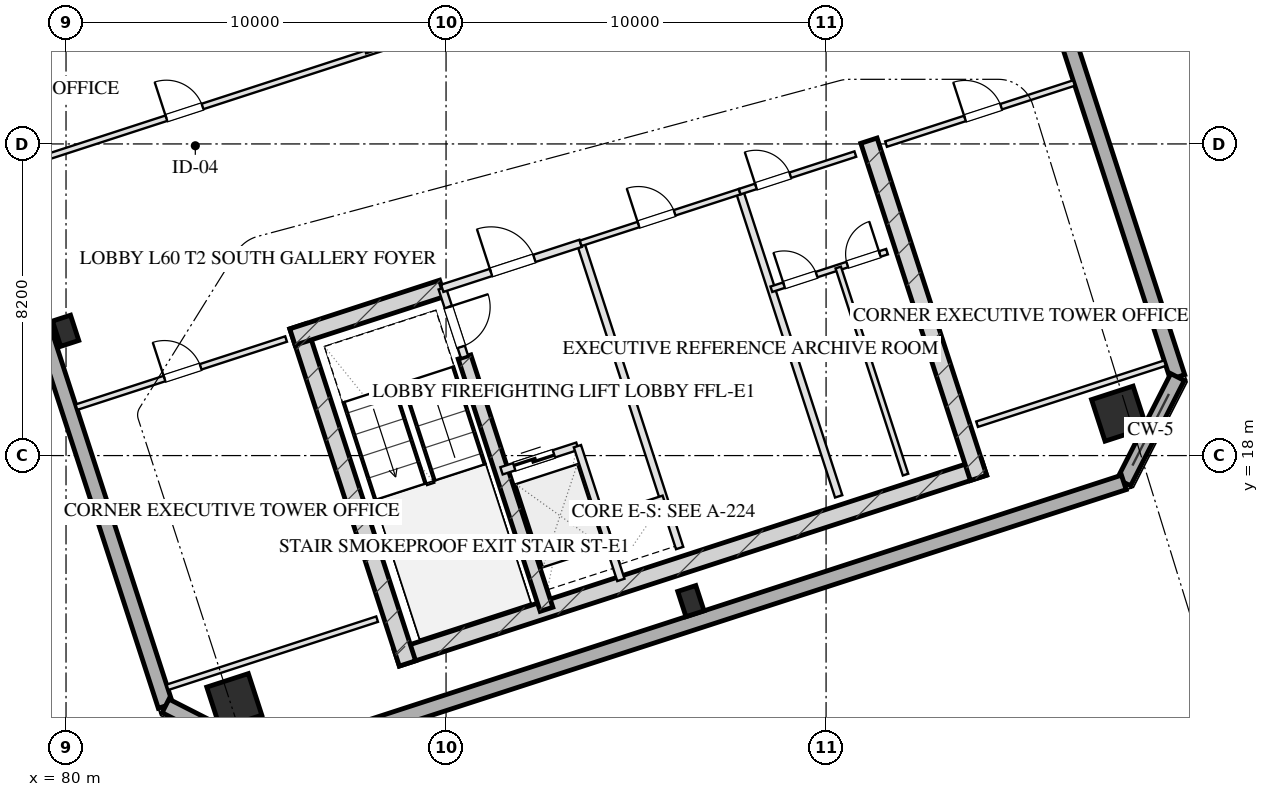
"""IFC4 building model, lengths in metres.
Left out: names, types, materials, properties, quantities, classifications, styles, units other than length and angle.
Written with IfcOpenShell. Run it as: python <this file> out.ifc"""

import sys

from ifc_helpers import new_model, si_unit, direction, frame, frame_2d, origin, origin_2d, place, context, subcontext, project, spatial, rectangle, hollow_rectangle, extrude, element, fill, save


model = new_model("IFC4")
c1 = context("Model", 3, precision=1e-05, world=origin(), true_north=direction((0.0, 1.0)))
c2 = subcontext(c1, "Body", "Model", "MODEL_VIEW")
j1 = project(units=[si_unit("LENGTHUNIT", "METRE"), si_unit("PLANEANGLEUNIT", "RADIAN")], contexts=[c1])
p1 = place(None, origin())
s1 = spatial("IfcSite", under=j1, at=p1, CompositionType="ELEMENT")
p2 = place(p1, origin())
s2 = spatial("IfcBuilding", under=s1, at=p2, CompositionType="ELEMENT")
p3 = place(p2, frame((0.0, 0.0, 223.1)))
s3 = spatial("IfcBuildingStorey", under=s2, at=p3, CompositionType="ELEMENT", Elevation=223.1)
p4 = place(p3, frame((88.701, 12.675, 0.0), z_axis=(0.0, 0.0, 1.0), x_axis=(0.95105824505, 0.309011673763, 0.0)))
e1 = element("IfcWall", 1, at=p4, inside=s3, PredefinedType="SHEAR", context=c2, shape_type="SweptSolid", body=[
    extrude(rectangle(XDim=16.25, YDim=0.45, at=frame_2d((8.125, 0.0))), origin(), (0.0, 0.0, 1.0), 3.45),
])
for number, where, z_axis, x_axis in (
    (2, (86.102, 21.404, 0.0), (0.0, 0.0, 1.0), (0.309, -0.951, 0.0)),
    (3, (101.128, 26.286, 0.0), (0.0, 0.0, 1.0), (0.309, -0.951, 0.0)),
):
    element("IfcWall", number, at=place(p3, frame(where, z_axis=z_axis, x_axis=x_axis)), inside=s3, PredefinedType="SHEAR", context=c2, shape_type="SweptSolid", body=[
        extrude(rectangle(XDim=9.33, YDim=0.45, at=frame_2d((4.665, 0.0))), origin(), (0.0, 0.0, 1.0), 3.45),
    ])
p5 = place(p3, frame((90.486, 20.594, 0.0), z_axis=(0.0, 0.0, 1.0), x_axis=(0.309020428229, -0.951055400562, 0.0)))
e4 = element("IfcWall", 4, at=p5, inside=s3, PredefinedType="SHEAR", context=c2, shape_type="SweptSolid", body=[
    extrude(rectangle(XDim=6.98, YDim=0.35, at=frame_2d((3.49, 0.0))), origin(), (0.0, 0.0, 1.0), 3.45),
])
p6 = place(p3, frame((85.957, 21.12, 0.0), z_axis=(0.0, 0.0, 1.0), x_axis=(0.951064796122, 0.308991510526, 0.0)))
e5 = element("IfcWall", 5, at=p6, inside=s3, PredefinedType="SHEAR", context=c2, shape_type="SweptSolid", body=[
    extrude(rectangle(XDim=4.145, YDim=0.45, at=frame_2d((2.073, 0.0))), origin(), (0.0, 0.0, 1.0), 3.45),
])
for number, where, z_axis, x_axis in (
    (6, (84.428, 11.539, 0.0), (0.0, 0.0, 1.0), (0.951, 0.309, 0.0)),
    (7, (107.71, 19.104, 0.0), (0.0, 0.0, 1.0), (0.951, 0.309, 0.0)),
):
    element("IfcColumn", number, at=place(p3, frame(where, z_axis=z_axis, x_axis=x_axis)), inside=s3, PredefinedType="COLUMN", context=c2, shape_type="SweptSolid", body=[
        extrude(hollow_rectangle(XDim=1.15, YDim=1.15, WallThickness=0.04, at=origin_2d()), origin(), (0.0, 0.0, 1.0), 3.451),
    ])
for number, where, z_axis, x_axis in (
    (8, (79.99, 21.284, 0.0), (0.0, 0.0, 1.0), (0.951, 0.309, 0.0)),
    (9, (96.443, 14.17, 0.0), (0.0, 0.0, 1.0), (0.951, 0.309, 0.0)),
):
    element("IfcColumn", number, at=place(p3, frame(where, z_axis=z_axis, x_axis=x_axis)), inside=s3, PredefinedType="COLUMN", context=c2, shape_type="SweptSolid", body=[
        extrude(hollow_rectangle(XDim=0.5, YDim=0.7, WallThickness=0.025, at=origin_2d()), origin(), (0.0, 0.0, 1.0), 3.451),
    ])
p7 = place(p3, frame((82.618, 11.414, 0.0), z_axis=(0.0, 0.0, 1.0), x_axis=(-0.309016491071, 0.951056679828, 0.0)))
e10 = element("IfcWall", 10, at=p7, inside=s3, PredefinedType="SOLIDWALL", context=c2, shape_type="SweptSolid", body=[
    extrude(rectangle(XDim=38.4, YDim=0.4, at=frame_2d((19.2, 0.0))), origin(), (0.0, 0.0, 1.0), 2.61),
])
p8 = place(p7, frame((11.75, 0.0, 0.75)))
e11 = element("IfcOpeningElement", 11, at=p8, cuts=e10, PredefinedType="OPENING", context=c2, shape_type="SweptSolid", body=[
    extrude(rectangle(XDim=2.1, YDim=1.46, at=frame_2d((1.05, 0.73))), frame((0.0, 0.21, 0.0), z_axis=(0.0, -1.0, 0.0), x_axis=(1.0, 0.0, 0.0)), (0.0, 0.0, 1.0), 0.42),
])
p9 = place(p7, frame((15.55, 0.0, 0.75)))
e12 = element("IfcOpeningElement", 12, at=p9, cuts=e10, PredefinedType="OPENING", context=c2, shape_type="SweptSolid", body=[
    extrude(rectangle(XDim=2.1, YDim=1.46, at=frame_2d((1.05, 0.73))), frame((0.0, 0.21, 0.0), z_axis=(0.0, -1.0, 0.0), x_axis=(1.0, 0.0, 0.0)), (0.0, 0.0, 1.0), 0.42),
])
p10 = place(p7, frame((20.75, 0.0, 0.75)))
e13 = element("IfcOpeningElement", 13, at=p10, cuts=e10, PredefinedType="OPENING", context=c2, shape_type="SweptSolid", body=[
    extrude(rectangle(XDim=2.1, YDim=1.46, at=frame_2d((1.05, 0.73))), frame((0.0, 0.21, 0.0), z_axis=(0.0, -1.0, 0.0), x_axis=(1.0, 0.0, 0.0)), (0.0, 0.0, 1.0), 0.42),
])
p11 = place(p7, frame((24.55, 0.0, 0.75)))
e14 = element("IfcOpeningElement", 14, at=p11, cuts=e10, PredefinedType="OPENING", context=c2, shape_type="SweptSolid", body=[
    extrude(rectangle(XDim=2.1, YDim=1.46, at=frame_2d((1.05, 0.73))), frame((0.0, 0.21, 0.0), z_axis=(0.0, -1.0, 0.0), x_axis=(1.0, 0.0, 0.0)), (0.0, 0.0, 1.0), 0.42),
])
p12 = place(p3, frame((97.382, 56.586, 0.0), z_axis=(0.0, 0.0, 1.0), x_axis=(0.309016491071, -0.951056679828, 0.0)))
e15 = element("IfcWall", 15, at=p12, inside=s3, PredefinedType="SOLIDWALL", context=c2, shape_type="SweptSolid", body=[
    extrude(rectangle(XDim=38.4, YDim=0.4, at=frame_2d((19.2, 0.0))), origin(), (0.0, 0.0, 1.0), 2.61),
])
p13 = place(p12, frame((24.55, 0.0, 0.75)))
e16 = element("IfcOpeningElement", 16, at=p13, cuts=e15, PredefinedType="OPENING", context=c2, shape_type="SweptSolid", body=[
    extrude(rectangle(XDim=2.1, YDim=1.46, at=frame_2d((1.05, 0.73))), frame((0.0, 0.21, 0.0), z_axis=(0.0, -1.0, 0.0), x_axis=(1.0, 0.0, 0.0)), (0.0, 0.0, 1.0), 0.42),
])
p14 = place(p12, frame((20.75, 0.0, 0.75)))
e17 = element("IfcOpeningElement", 17, at=p14, cuts=e15, PredefinedType="OPENING", context=c2, shape_type="SweptSolid", body=[
    extrude(rectangle(XDim=2.1, YDim=1.46, at=frame_2d((1.05, 0.73))), frame((0.0, 0.21, 0.0), z_axis=(0.0, -1.0, 0.0), x_axis=(1.0, 0.0, 0.0)), (0.0, 0.0, 1.0), 0.42),
])
p15 = place(p12, frame((15.55, 0.0, 0.75)))
e18 = element("IfcOpeningElement", 18, at=p15, cuts=e15, PredefinedType="OPENING", context=c2, shape_type="SweptSolid", body=[
    extrude(rectangle(XDim=2.1, YDim=1.46, at=frame_2d((1.05, 0.73))), frame((0.0, 0.21, 0.0), z_axis=(0.0, -1.0, 0.0), x_axis=(1.0, 0.0, 0.0)), (0.0, 0.0, 1.0), 0.42),
])
p16 = place(p12, frame((11.75, 0.0, 0.75)))
e19 = element("IfcOpeningElement", 19, at=p16, cuts=e15, PredefinedType="OPENING", context=c2, shape_type="SweptSolid", body=[
    extrude(rectangle(XDim=2.1, YDim=1.46, at=frame_2d((1.05, 0.73))), frame((0.0, 0.21, 0.0), z_axis=(0.0, -1.0, 0.0), x_axis=(1.0, 0.0, 0.0)), (0.0, 0.0, 1.0), 0.42),
])
p17 = place(p3, frame((109.248, 20.066, 0.0), z_axis=(0.0, 0.0, 1.0), x_axis=(-0.453949291228, -0.891027519774, 0.0)))
e20 = element("IfcWall", 20, at=p17, inside=s3, PredefinedType="SOLIDWALL", context=c2, shape_type="SweptSolid", body=[
    extrude(rectangle(XDim=3.111, YDim=0.4, at=frame_2d((1.556, 0.0))), origin(), (0.0, 0.0, 1.0), 2.61),
])
p18 = place(p3, frame((107.835, 17.294, 0.0), z_axis=(0.0, 0.0, 1.0), x_axis=(-0.951058012937, -0.309012388148, 0.0)))
e21 = element("IfcWall", 21, at=p18, inside=s3, PredefinedType="SOLIDWALL", context=c2, shape_type="SweptSolid", body=[
    extrude(rectangle(XDim=23.6, YDim=0.4, at=frame_2d((11.8, 0.0))), origin(), (0.0, 0.0, 1.0), 2.61),
])
p19 = place(p3, frame((85.39, 10.001, 0.0), z_axis=(0.0, 0.0, 1.0), x_axis=(-0.890979603174, 0.454043331334, 0.0)))
e22 = element("IfcWall", 22, at=p19, inside=s3, PredefinedType="SOLIDWALL", context=c2, shape_type="SweptSolid", body=[
    extrude(rectangle(XDim=3.111, YDim=0.4, at=frame_2d((1.556, 0.0))), origin(), (0.0, 0.0, 1.0), 2.61),
])
p20 = place(p3, frame((89.899, 22.401, 0.0), z_axis=(0.0, 0.0, 1.0), x_axis=(0.308932062672, -0.951084108086, 0.0)))
e23 = element("IfcWall", 23, at=p20, inside=s3, PredefinedType="PARTITIONING", context=c2, shape_type="SweptSolid", body=[
    extrude(rectangle(XDim=1.9, YDim=0.2, at=frame_2d((0.95, 0.0))), origin(), (0.0, 0.0, 1.0), 3.175),
])
p21 = place(p20, frame((0.52, 0.0, 0.0)))
e24 = element("IfcOpeningElement", 24, at=p21, cuts=e23, PredefinedType="OPENING", context=c2, shape_type="SweptSolid", body=[
    extrude(rectangle(XDim=1.1, YDim=2.05, at=frame_2d((0.55, 1.025))), frame((0.0, 0.11, 0.0), z_axis=(0.0, -1.0, 0.0), x_axis=(1.0, 0.0, 0.0)), (0.0, 0.0, 1.0), 0.22),
])
p22 = place(p3, frame((93.542, 23.585, 0.0), z_axis=(0.0, 0.0, 1.0), x_axis=(0.309042196757, -0.951048327176, 0.0)))
e25 = element("IfcWall", 25, at=p22, inside=s3, PredefinedType="PARTITIONING", context=c2, shape_type="SweptSolid", body=[
    extrude(rectangle(XDim=8.43, YDim=0.2, at=frame_2d((4.215, 0.0))), origin(), (0.0, 0.0, 1.0), 3.175),
])
p23 = place(p3, frame((89.899, 22.401, 0.0), z_axis=(0.0, 0.0, 1.0), x_axis=(0.951046716504, 0.309047153403, 0.0)))
e26 = element("IfcWall", 26, at=p23, inside=s3, PredefinedType="PARTITIONING", context=c2, shape_type="SweptSolid", body=[
    extrude(rectangle(XDim=3.83, YDim=0.2, at=frame_2d((1.915, 0.0))), origin(), (0.0, 0.0, 1.0), 3.175),
])
p24 = place(p23, frame((1.35, 0.0, 0.0)))
e27 = element("IfcOpeningElement", 27, at=p24, cuts=e26, PredefinedType="OPENING", context=c2, shape_type="SweptSolid", body=[
    extrude(rectangle(XDim=1.2, YDim=2.05, at=frame_2d((0.6, 1.025))), frame((0.0, 0.11, 0.0), z_axis=(0.0, -1.0, 0.0), x_axis=(1.0, 0.0, 0.0)), (0.0, 0.0, 1.0), 0.22),
])
p25 = place(p3, frame((91.46, 17.598, 0.0), z_axis=(0.0, 0.0, 1.0), x_axis=(0.951062257173, 0.308999325213, 0.0)))
e28 = element("IfcWall", 28, at=p25, inside=s3, PredefinedType="PARTITIONING", context=c2, shape_type="SweptSolid", body=[
    extrude(rectangle(XDim=2.1, YDim=0.2, at=frame_2d((1.05, 0.0))), origin(), (0.0, 0.0, 1.0), 3.175),
])
p26 = place(p25, frame((0.35, 0.0, 0.0)))
e29 = element("IfcOpeningElement", 29, at=p26, cuts=e28, PredefinedType="OPENING", context=c2, shape_type="SweptSolid", body=[
    extrude(rectangle(XDim=1.1, YDim=2.05, at=frame_2d((0.55, 1.025))), frame((0.0, 0.11, 0.0), z_axis=(0.0, -1.0, 0.0), x_axis=(1.0, 0.0, 0.0)), (0.0, 0.0, 1.0), 0.22),
])
p27 = place(p3, frame((93.457, 18.247, 0.0), z_axis=(0.0, 0.0, 1.0), x_axis=(0.3089935693, -0.951064127245, 0.0)))
e30 = element("IfcWall", 30, at=p27, inside=s3, PredefinedType="PARTITIONING", context=c2, shape_type="SweptSolid", body=[
    extrude(rectangle(XDim=3.7, YDim=0.2, at=frame_2d((1.85, 0.0))), origin(), (0.0, 0.0, 1.0), 3.175),
])
p28 = place(p3, frame((94.084, 16.317, 0.0), z_axis=(0.0, 0.0, 1.0), x_axis=(0.951041328149, 0.309063734775, 0.0)))
e31 = element("IfcWall", 31, at=p28, inside=s3, PredefinedType="PARTITIONING", context=c2, shape_type="SweptSolid", body=[
    extrude(rectangle(XDim=1.73, YDim=0.2, at=frame_2d((0.865, 0.0))), origin(), (0.0, 0.0, 1.0), 3.175),
])
p29 = place(p3, frame((97.727, 24.944, 0.0), z_axis=(0.0, 0.0, 1.0), x_axis=(0.309016001439, -0.951056838919, 0.0)))
e32 = element("IfcWall", 32, at=p29, inside=s3, PredefinedType="PARTITIONING", context=c2, shape_type="SweptSolid", body=[
    extrude(rectangle(XDim=8.43, YDim=0.2, at=frame_2d((4.215, 0.0))), origin(), (0.0, 0.0, 1.0), 3.175),
])
p30 = place(p3, frame((93.542, 23.585, 0.0), z_axis=(0.0, 0.0, 1.0), x_axis=(0.951063829732, 0.308994485023, 0.0)))
e33 = element("IfcWall", 33, at=p30, inside=s3, PredefinedType="PARTITIONING", context=c2, shape_type="SweptSolid", body=[
    extrude(rectangle(XDim=4.4, YDim=0.15, at=frame_2d((2.2, 0.0))), origin(), (0.0, 0.0, 1.0), 3.175),
])
p31 = place(p30, frame((1.6, 0.0, 0.0)))
e34 = element("IfcOpeningElement", 34, at=p31, cuts=e33, PredefinedType="OPENING", context=c2, shape_type="SweptSolid", body=[
    extrude(rectangle(XDim=1.0, YDim=2.05, at=frame_2d((0.5, 1.025))), frame((0.0, 0.085, 0.0), z_axis=(0.0, -1.0, 0.0), x_axis=(1.0, 0.0, 0.0)), (0.0, 0.0, 1.0), 0.17),
])
p32 = place(p3, frame((97.727, 24.944, 0.0), z_axis=(0.0, 0.0, 1.0), x_axis=(0.951036872128, 0.309077446369, 0.0)))
e35 = element("IfcWall", 35, at=p32, inside=s3, PredefinedType="PARTITIONING", context=c2, shape_type="SweptSolid", body=[
    extrude(rectangle(XDim=3.2, YDim=0.15, at=frame_2d((1.6, 0.0))), origin(), (0.0, 0.0, 1.0), 3.175),
])
p33 = place(p32, frame((0.45, 0.0, 0.0)))
e36 = element("IfcOpeningElement", 36, at=p33, cuts=e35, PredefinedType="OPENING", context=c2, shape_type="SweptSolid", body=[
    extrude(rectangle(XDim=0.95, YDim=2.05, at=frame_2d((0.475, 1.025))), frame((0.0, 0.085, 0.0), z_axis=(0.0, -1.0, 0.0), x_axis=(1.0, 0.0, 0.0)), (0.0, 0.0, 1.0), 0.17),
])
p34 = place(p3, frame((98.561, 22.376, 0.0), z_axis=(0.0, 0.0, 1.0), x_axis=(0.95104415986, 0.309055020985, 0.0)))
e37 = element("IfcWall", 37, at=p34, inside=s3, PredefinedType="PARTITIONING", context=c2, shape_type="SweptSolid", body=[
    extrude(rectangle(XDim=3.2, YDim=0.15, at=frame_2d((1.6, 0.0))), origin(), (0.0, 0.0, 1.0), 3.175),
])
p35 = place(p34, frame((0.35, 0.0, 0.0)))
e38 = element("IfcOpeningElement", 38, at=p35, cuts=e37, PredefinedType="OPENING", context=c2, shape_type="SweptSolid", body=[
    extrude(rectangle(XDim=0.9, YDim=2.05, at=frame_2d((0.45, 1.025))), frame((0.0, 0.085, 0.0), z_axis=(0.0, -1.0, 0.0), x_axis=(1.0, 0.0, 0.0)), (0.0, 0.0, 1.0), 0.17),
])
p36 = place(p34, frame((2.1, 0.0, 0.0)))
e39 = element("IfcOpeningElement", 39, at=p36, cuts=e37, PredefinedType="OPENING", context=c2, shape_type="SweptSolid", body=[
    extrude(rectangle(XDim=0.9, YDim=2.05, at=frame_2d((0.45, 1.025))), frame((0.0, 0.085, 0.0), z_axis=(0.0, -1.0, 0.0), x_axis=(1.0, 0.0, 0.0)), (0.0, 0.0, 1.0), 0.17),
])
p37 = place(p3, frame((100.32, 22.948, 0.0), z_axis=(0.0, 0.0, 1.0), x_axis=(0.309035009867, -0.951050662518, 0.0)))
e40 = element("IfcWall", 40, at=p37, inside=s3, PredefinedType="PARTITIONING", context=c2, shape_type="SweptSolid", body=[
    extrude(rectangle(XDim=5.73, YDim=0.15, at=frame_2d((2.865, 0.0))), origin(), (0.0, 0.0, 1.0), 3.175),
])
p38 = place(p3, frame((82.669, 11.903, 0.0), z_axis=(0.0, 0.0, 1.0), x_axis=(0.951059431056, 0.309008023519, 0.0)))
e41 = element("IfcWall", 41, at=p38, inside=s3, PredefinedType="PARTITIONING", context=c2, shape_type="SweptSolid", body=[
    extrude(rectangle(XDim=5.8, YDim=0.15, at=frame_2d((2.9, 0.0))), origin(), (0.0, 0.0, 1.0), 3.175),
])
p39 = place(p3, frame((80.275, 19.274, 0.0), z_axis=(0.0, 0.0, 1.0), x_axis=(0.951059431056, 0.309008023519, 0.0)))
e42 = element("IfcWall", 42, at=p39, inside=s3, PredefinedType="PARTITIONING", context=c2, shape_type="SweptSolid", body=[
    extrude(rectangle(XDim=5.8, YDim=0.15, at=frame_2d((2.9, 0.0))), origin(), (0.0, 0.0, 1.0), 3.175),
])
p40 = place(p39, frame((2.436, 0.0, 0.0)))
e43 = element("IfcOpeningElement", 43, at=p40, cuts=e42, PredefinedType="OPENING", context=c2, shape_type="SweptSolid", body=[
    extrude(rectangle(XDim=1.0, YDim=2.05, at=frame_2d((0.5, 1.025))), frame((0.0, 0.085, 0.0), z_axis=(0.0, -1.0, 0.0), x_axis=(1.0, 0.0, 0.0)), (0.0, 0.0, 1.0), 0.17),
])
p41 = place(p3, frame((103.973, 18.825, 0.0), z_axis=(0.0, 0.0, 1.0), x_axis=(0.951055112834, 0.309021313752, 0.0)))
e44 = element("IfcWall", 44, at=p41, inside=s3, PredefinedType="PARTITIONING", context=c2, shape_type="SweptSolid", body=[
    extrude(rectangle(XDim=5.2, YDim=0.15, at=frame_2d((2.6, 0.0))), origin(), (0.0, 0.0, 1.0), 3.175),
])
p42 = place(p3, frame((101.578, 26.196, 0.0), z_axis=(0.0, 0.0, 1.0), x_axis=(0.951064427824, 0.308992644131, 0.0)))
e45 = element("IfcWall", 45, at=p42, inside=s3, PredefinedType="PARTITIONING", context=c2, shape_type="SweptSolid", body=[
    extrude(rectangle(XDim=5.2, YDim=0.15, at=frame_2d((2.6, 0.0))), origin(), (0.0, 0.0, 1.0), 3.175),
])
p43 = place(p42, frame((2.184, 0.0, 0.0)))
e46 = element("IfcOpeningElement", 46, at=p43, cuts=e45, PredefinedType="OPENING", context=c2, shape_type="SweptSolid", body=[
    extrude(rectangle(XDim=1.0, YDim=2.05, at=frame_2d((0.5, 1.025))), frame((0.0, 0.085, 0.0), z_axis=(0.0, -1.0, 0.0), x_axis=(1.0, 0.0, 0.0)), (0.0, 0.0, 1.0), 0.17),
])
p44 = place(p3, frame((78.266, 25.456, 0.0), z_axis=(0.0, 0.0, 1.0), x_axis=(0.951056617779, 0.30901668204, 0.0)))
e47 = element("IfcWall", 47, at=p44, inside=s3, PredefinedType="PARTITIONING", context=c2, shape_type="SweptSolid", body=[
    extrude(rectangle(XDim=15.275, YDim=0.15, at=frame_2d((7.637, 0.0))), origin(), (0.0, 0.0, 1.0), 3.175),
])
p45 = place(p44, frame((4.6, 0.0, 0.0)))
e48 = element("IfcOpeningElement", 48, at=p45, cuts=e47, PredefinedType="OPENING", context=c2, shape_type="SweptSolid", body=[
    extrude(rectangle(XDim=1.0, YDim=2.05, at=frame_2d((0.5, 1.025))), frame((0.0, 0.085, 0.0), z_axis=(0.0, -1.0, 0.0), x_axis=(1.0, 0.0, 0.0)), (0.0, 0.0, 1.0), 0.17),
])
p46 = place(p3, frame((87.967, 28.608, 0.0), z_axis=(0.0, 0.0, 1.0), x_axis=(-0.309004845045, 0.951060463766, 0.0)))
e49 = element("IfcWall", 49, at=p46, inside=s3, PredefinedType="PARTITIONING", context=c2, shape_type="SweptSolid", body=[
    extrude(rectangle(XDim=3.33, YDim=0.15, at=frame_2d((1.665, 0.0))), origin(), (0.0, 0.0, 1.0), 3.175),
])
p47 = place(p3, frame((77.237, 28.623, 0.0), z_axis=(0.0, 0.0, 1.0), x_axis=(0.951056617779, 0.30901668204, 0.0)))
e50 = element("IfcWall", 50, at=p47, inside=s3, PredefinedType="PARTITIONING", context=c2, shape_type="SweptSolid", body=[
    extrude(rectangle(XDim=15.275, YDim=0.15, at=frame_2d((7.637, 0.0))), origin(), (0.0, 0.0, 1.0), 3.175),
])
p48 = place(p21, origin())
e51 = element("IfcDoor", 51, at=p48, inside=s3, OperationType="SINGLE_SWING_LEFT", PredefinedType="DOOR", context=c2, shape_type="SweptSolid", body=[
    extrude(rectangle(XDim=1.1, YDim=2.05, at=frame_2d((0.55, 1.025))), frame((0.0, 0.025, 0.0), z_axis=(0.0, -1.0, 0.0), x_axis=(1.0, 0.0, 0.0)), (0.0, 0.0, 1.0), 0.05),
])
fill(e24, e51)
p49 = place(p24, origin())
e52 = element("IfcDoor", 52, at=p49, inside=s3, OperationType="SINGLE_SWING_LEFT", PredefinedType="DOOR", context=c2, shape_type="SweptSolid", body=[
    extrude(rectangle(XDim=1.2, YDim=2.05, at=frame_2d((0.6, 1.025))), frame((0.0, 0.025, 0.0), z_axis=(0.0, -1.0, 0.0), x_axis=(1.0, 0.0, 0.0)), (0.0, 0.0, 1.0), 0.05),
])
fill(e27, e52)
p50 = place(p26, origin())
e53 = element("IfcDoor", 53, at=p50, inside=s3, OperationType="DOUBLE_DOOR_SLIDING", PredefinedType="DOOR", context=c2, shape_type="SweptSolid", body=[
    extrude(rectangle(XDim=1.1, YDim=2.05, at=frame_2d((0.55, 1.025))), frame((0.0, 0.025, 0.0), z_axis=(0.0, -1.0, 0.0), x_axis=(1.0, 0.0, 0.0)), (0.0, 0.0, 1.0), 0.05),
])
fill(e29, e53)
p51 = place(p31, origin())
e54 = element("IfcDoor", 54, at=p51, inside=s3, OperationType="SINGLE_SWING_LEFT", PredefinedType="DOOR", context=c2, shape_type="SweptSolid", body=[
    extrude(rectangle(XDim=1.0, YDim=2.05, at=frame_2d((0.5, 1.025))), frame((0.0, 0.025, 0.0), z_axis=(0.0, -1.0, 0.0), x_axis=(1.0, 0.0, 0.0)), (0.0, 0.0, 1.0), 0.05),
])
fill(e34, e54)
p52 = place(p33, origin())
e55 = element("IfcDoor", 55, at=p52, inside=s3, OperationType="SINGLE_SWING_LEFT", PredefinedType="DOOR", context=c2, shape_type="SweptSolid", body=[
    extrude(rectangle(XDim=0.95, YDim=2.05, at=frame_2d((0.475, 1.025))), frame((0.0, 0.025, 0.0), z_axis=(0.0, -1.0, 0.0), x_axis=(1.0, 0.0, 0.0)), (0.0, 0.0, 1.0), 0.05),
])
fill(e36, e55)
p53 = place(p35, origin())
e56 = element("IfcDoor", 56, at=p53, inside=s3, OperationType="SINGLE_SWING_LEFT", PredefinedType="DOOR", context=c2, shape_type="SweptSolid", body=[
    extrude(rectangle(XDim=0.9, YDim=2.05, at=frame_2d((0.45, 1.025))), frame((0.0, 0.025, 0.0), z_axis=(0.0, -1.0, 0.0), x_axis=(1.0, 0.0, 0.0)), (0.0, 0.0, 1.0), 0.05),
])
fill(e38, e56)
p54 = place(p36, origin())
e57 = element("IfcDoor", 57, at=p54, inside=s3, OperationType="SINGLE_SWING_RIGHT", PredefinedType="DOOR", context=c2, shape_type="SweptSolid", body=[
    extrude(rectangle(XDim=0.9, YDim=2.05, at=frame_2d((0.45, 1.025))), frame((0.0, 0.025, 0.0), z_axis=(0.0, -1.0, 0.0), x_axis=(1.0, 0.0, 0.0)), (0.0, 0.0, 1.0), 0.05),
])
fill(e39, e57)
p55 = place(p40, origin())
e58 = element("IfcDoor", 58, at=p55, inside=s3, OperationType="SINGLE_SWING_LEFT", PredefinedType="DOOR", context=c2, shape_type="SweptSolid", body=[
    extrude(rectangle(XDim=1.0, YDim=2.05, at=frame_2d((0.5, 1.025))), frame((0.0, 0.025, 0.0), z_axis=(0.0, -1.0, 0.0), x_axis=(1.0, 0.0, 0.0)), (0.0, 0.0, 1.0), 0.05),
])
fill(e43, e58)
p56 = place(p43, origin())
e59 = element("IfcDoor", 59, at=p56, inside=s3, OperationType="SINGLE_SWING_LEFT", PredefinedType="DOOR", context=c2, shape_type="SweptSolid", body=[
    extrude(rectangle(XDim=1.0, YDim=2.05, at=frame_2d((0.5, 1.025))), frame((0.0, 0.025, 0.0), z_axis=(0.0, -1.0, 0.0), x_axis=(1.0, 0.0, 0.0)), (0.0, 0.0, 1.0), 0.05),
])
fill(e46, e59)
p57 = place(p45, origin())
e60 = element("IfcDoor", 60, at=p57, inside=s3, OperationType="SINGLE_SWING_LEFT", PredefinedType="DOOR", context=c2, shape_type="SweptSolid", body=[
    extrude(rectangle(XDim=1.0, YDim=2.05, at=frame_2d((0.5, 1.025))), frame((0.0, 0.025, 0.0), z_axis=(0.0, -1.0, 0.0), x_axis=(1.0, 0.0, 0.0)), (0.0, 0.0, 1.0), 0.05),
])
fill(e48, e60)
save(model, sys.argv[1])
